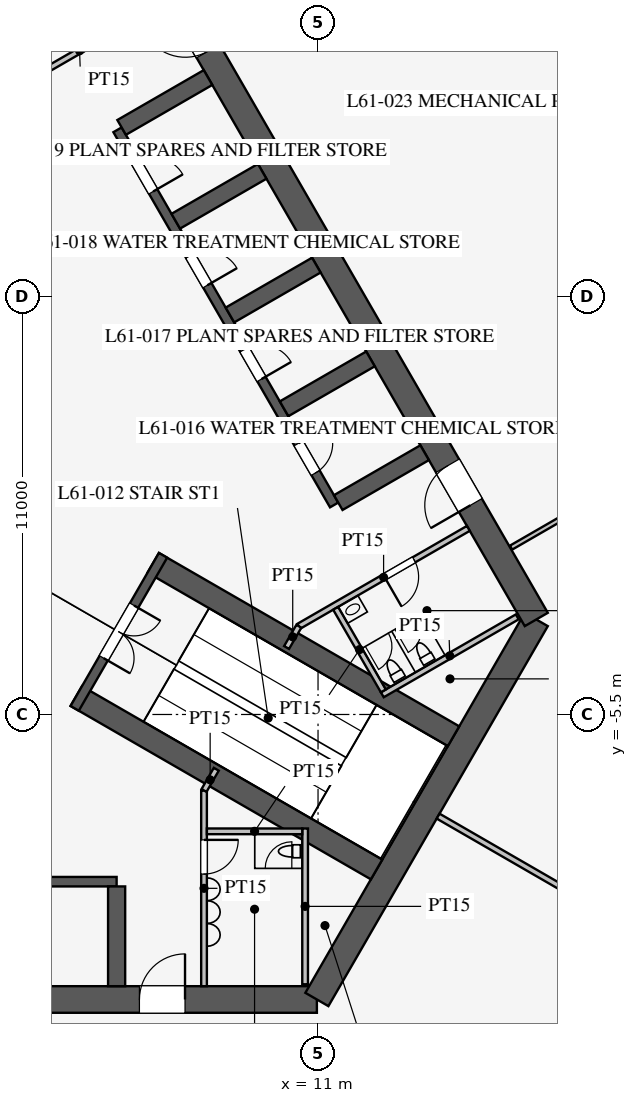
"""IFC4 building model, lengths in metres.
Left out: names, types, materials, properties, quantities, classifications, styles, units other than length and angle.
Written with IfcOpenShell. Run it as: python <this file> out.ifc"""

import sys

from ifc_helpers import new_model, si_unit, direction, frame, frame_2d, origin, place, context, subcontext, project, spatial, rectangle, extrude, element, fill, save


model = new_model("IFC4")
c1 = context("Model", 3, precision=1e-05, world=origin(), true_north=direction((0.0, 1.0)))
c2 = subcontext(c1, "Body", "Model", "MODEL_VIEW")
j1 = project(units=[si_unit("LENGTHUNIT", "METRE"), si_unit("PLANEANGLEUNIT", "RADIAN")], contexts=[c1])
p1 = place(None, origin())
s1 = spatial("IfcSite", under=j1, at=p1, CompositionType="ELEMENT")
p2 = place(p1, origin())
s2 = spatial("IfcBuilding", under=s1, at=p2, CompositionType="ELEMENT")
p3 = place(p2, frame((0.0, 0.0, 265.3)))
s3 = spatial("IfcBuildingStorey", under=s2, at=p3, CompositionType="ELEMENT", Elevation=265.3)
p4 = place(p3, frame((-10.97, -13.0, 0.0), z_axis=(0.0, 0.0, 1.0), x_axis=(1.0, 0.0, 0.0)))
e1 = element("IfcWall", 1, at=p4, inside=s3, PredefinedType="SHEAR", context=c2, shape_type="SweptSolid", body=[
    extrude(rectangle(XDim=21.939, YDim=0.7, at=frame_2d((10.97, 0.0))), origin(), (0.0, 0.0, 1.0), 6.0),
])
p5 = place(p4, frame((17.27, 0.0, 0.0)))
e2 = element("IfcOpeningElement", 2, at=p5, cuts=e1, PredefinedType="OPENING", context=c2, shape_type="SweptSolid", body=[
    extrude(rectangle(XDim=1.2, YDim=2.1, at=frame_2d((0.6, 1.05))), frame((0.0, 0.36, 0.0), z_axis=(0.0, -1.0, 0.0), x_axis=(1.0, 0.0, 0.0)), (0.0, 0.0, 1.0), 0.72),
])
p6 = place(p4, frame((3.47, 0.0, 0.0)))
e3 = element("IfcOpeningElement", 3, at=p6, cuts=e1, PredefinedType="OPENING", context=c2, shape_type="SweptSolid", body=[
    extrude(rectangle(XDim=1.2, YDim=2.1, at=frame_2d((0.6, 1.05))), frame((0.0, 0.36, 0.0), z_axis=(0.0, -1.0, 0.0), x_axis=(1.0, 0.0, 0.0)), (0.0, 0.0, 1.0), 0.72),
])
p7 = place(p3, frame((10.97, -13.0, 0.0), z_axis=(0.0, 0.0, 1.0), x_axis=(0.499995765644, 0.866027848477, 0.0)))
e4 = element("IfcWall", 4, at=p7, inside=s3, PredefinedType="SHEAR", context=c2, shape_type="SweptSolid", body=[
    extrude(rectangle(XDim=11.547, YDim=0.7, at=frame_2d((5.773, 0.0))), origin(), (0.0, 0.0, 1.0), 6.0),
])
p8 = place(p3, frame((16.743, -3.0, 0.0), z_axis=(0.0, 0.0, 1.0), x_axis=(-0.500002442456, 0.866023993627, 0.0)))
e5 = element("IfcWall", 5, at=p8, inside=s3, PredefinedType="SHEAR", context=c2, shape_type="SweptSolid", body=[
    extrude(rectangle(XDim=21.939, YDim=0.7, at=frame_2d((10.97, 0.0))), origin(), (0.0, 0.0, 1.0), 6.0),
])
p9 = place(p8, frame((17.27, 0.0, 0.0)))
e6 = element("IfcOpeningElement", 6, at=p9, cuts=e5, PredefinedType="OPENING", context=c2, shape_type="SweptSolid", body=[
    extrude(rectangle(XDim=1.2, YDim=2.1, at=frame_2d((0.6, 1.05))), frame((0.0, 0.36, 0.0), z_axis=(0.0, -1.0, 0.0), x_axis=(1.0, 0.0, 0.0)), (0.0, 0.0, 1.0), 0.72),
])
p10 = place(p8, frame((3.47, 0.0, 0.0)))
e7 = element("IfcOpeningElement", 7, at=p10, cuts=e5, PredefinedType="OPENING", context=c2, shape_type="SweptSolid", body=[
    extrude(rectangle(XDim=1.2, YDim=2.1, at=frame_2d((0.6, 1.05))), frame((0.0, 0.36, 0.0), z_axis=(0.0, -1.0, 0.0), x_axis=(1.0, 0.0, 0.0)), (0.0, 0.0, 1.0), 0.72),
])
p11 = place(p3, frame((-5.7, -9.9, 0.0), z_axis=(0.0, 0.0, 1.0), x_axis=(1.0, 0.0, 0.0)))
e8 = element("IfcWall", 8, at=p11, inside=s3, PredefinedType="SHEAR", context=c2, shape_type="SweptSolid", body=[
    extrude(rectangle(XDim=11.4, YDim=0.25, at=frame_2d((5.7, 0.0))), origin(), (0.0, 0.0, 1.0), 6.0),
])
p12 = place(p3, frame((5.7, -10.025, 0.0), z_axis=(0.0, 0.0, 1.0), x_axis=(0.0, -1.0, 0.0)))
e9 = element("IfcWall", 9, at=p12, inside=s3, PredefinedType="SHEAR", context=c2, shape_type="SweptSolid", body=[
    extrude(rectangle(XDim=2.625, YDim=0.45, at=frame_2d((1.312, 0.0))), origin(), (0.0, 0.0, 1.0), 6.0),
])
p13 = place(p3, frame((11.424, 0.014, 0.0), z_axis=(0.0, 0.0, 1.0), x_axis=(-0.500001763848, 0.866024385424, 0.0)))
e10 = element("IfcWall", 10, at=p13, inside=s3, PredefinedType="SHEAR", context=c2, shape_type="SweptSolid", body=[
    extrude(rectangle(XDim=11.4, YDim=0.25, at=frame_2d((5.7, 0.0))), origin(), (0.0, 0.0, 1.0), 6.0),
])
p14 = place(p13, frame((0.975, 0.0, 0.0)))
e11 = element("IfcOpeningElement", 11, at=p14, cuts=e10, PredefinedType="OPENING", context=c2, shape_type="SweptSolid", body=[
    extrude(rectangle(XDim=0.9, YDim=2.1, at=frame_2d((0.45, 1.05))), frame((0.0, 0.135, 0.0), z_axis=(0.0, -1.0, 0.0), x_axis=(1.0, 0.0, 0.0)), (0.0, 0.0, 1.0), 0.27),
])
p15 = place(p13, frame((3.825, 0.0, 0.0)))
e12 = element("IfcOpeningElement", 12, at=p15, cuts=e10, PredefinedType="OPENING", context=c2, shape_type="SweptSolid", body=[
    extrude(rectangle(XDim=0.9, YDim=2.1, at=frame_2d((0.45, 1.05))), frame((0.0, 0.135, 0.0), z_axis=(0.0, -1.0, 0.0), x_axis=(1.0, 0.0, 0.0)), (0.0, 0.0, 1.0), 0.27),
])
p16 = place(p13, frame((6.675, 0.0, 0.0)))
e13 = element("IfcOpeningElement", 13, at=p16, cuts=e10, PredefinedType="OPENING", context=c2, shape_type="SweptSolid", body=[
    extrude(rectangle(XDim=0.9, YDim=2.1, at=frame_2d((0.45, 1.05))), frame((0.0, 0.135, 0.0), z_axis=(0.0, -1.0, 0.0), x_axis=(1.0, 0.0, 0.0)), (0.0, 0.0, 1.0), 0.27),
])
p17 = place(p13, frame((9.525, 0.0, 0.0)))
e14 = element("IfcOpeningElement", 14, at=p17, cuts=e10, PredefinedType="OPENING", context=c2, shape_type="SweptSolid", body=[
    extrude(rectangle(XDim=0.9, YDim=2.1, at=frame_2d((0.45, 1.05))), frame((0.0, 0.135, 0.0), z_axis=(0.0, -1.0, 0.0), x_axis=(1.0, 0.0, 0.0)), (0.0, 0.0, 1.0), 0.27),
])
for number, where, z_axis, x_axis in (
    (15, (11.532, 0.076, 0.0), (0.0, 0.0, 1.0), (0.866, 0.5, 0.0)),
    (16, (10.107, 2.544, 0.0), (0.0, 0.0, 1.0), (0.866, 0.5, 0.0)),
    (17, (8.682, 5.012, 0.0), (0.0, 0.0, 1.0), (0.866, 0.5, 0.0)),
    (18, (7.257, 7.481, 0.0), (0.0, 0.0, 1.0), (0.866, 0.5, 0.0)),
    (19, (5.832, 9.949, 0.0), (0.0, 0.0, 1.0), (0.866, 0.5, 0.0)),
):
    element("IfcWall", number, at=place(p3, frame(where, z_axis=z_axis, x_axis=x_axis)), inside=s3, PredefinedType="SHEAR", context=c2, shape_type="SweptSolid", body=[
        extrude(rectangle(XDim=2.625, YDim=0.45, at=frame_2d((1.312, 0.0))), origin(), (0.0, 0.0, 1.0), 6.0),
    ])
for number, where, z_axis, x_axis in (
    (20, (4.638, -5.016, 0.0), (0.0, 0.0, 1.0), (0.866, -0.5, 0.0)),
    (21, (6.663, -1.509, 0.0), (0.0, 0.0, 1.0), (0.866, -0.5, 0.0)),
):
    element("IfcWall", number, at=place(p3, frame(where, z_axis=z_axis, x_axis=x_axis)), inside=s3, PredefinedType="SHEAR", context=c2, shape_type="SweptSolid", body=[
        extrude(rectangle(XDim=9.125, YDim=0.6, at=frame_2d((4.562, 0.0))), origin(), (0.0, 0.0, 1.0), 6.0),
    ])
p18 = place(p3, frame((4.597, -5.339, 0.0), z_axis=(0.0, 0.0, 1.0), x_axis=(0.499984536904, 0.866034331223, 0.0)))
e22 = element("IfcWall", 22, at=p18, inside=s3, PredefinedType="SHEAR", context=c2, shape_type="SweptSolid", body=[
    extrude(rectangle(XDim=4.65, YDim=0.25, at=frame_2d((2.325, 0.0))), origin(), (0.0, 0.0, 1.0), 6.0),
])
p19 = place(p18, frame((1.525, 0.0, 0.0)))
e23 = element("IfcOpeningElement", 23, at=p19, cuts=e22, PredefinedType="OPENING", context=c2, shape_type="SweptSolid", body=[
    extrude(rectangle(XDim=1.6, YDim=2.1, at=frame_2d((0.8, 1.05))), frame((0.0, 0.135, 0.0), z_axis=(0.0, -1.0, 0.0), x_axis=(1.0, 0.0, 0.0)), (0.0, 0.0, 1.0), 0.27),
])
p20 = place(p3, frame((8.0, -7.5, 0.0), z_axis=(0.0, 0.0, 1.0), x_axis=(0.0, -1.0, 0.0)))
e24 = element("IfcWall", 24, at=p20, inside=s3, PredefinedType="PARTITIONING", context=c2, shape_type="SweptSolid", body=[
    extrude(rectangle(XDim=5.15, YDim=0.15, at=frame_2d((2.575, 0.0))), origin(), (0.0, 0.0, 1.0), 5.8),
])
p21 = place(p20, frame((1.3, 0.0, 0.0)))
e25 = element("IfcOpeningElement", 25, at=p21, cuts=e24, PredefinedType="OPENING", context=c2, shape_type="SweptSolid", body=[
    extrude(rectangle(XDim=0.9, YDim=2.1, at=frame_2d((0.45, 1.05))), frame((0.0, 0.085, 0.0), z_axis=(0.0, -1.0, 0.0), x_axis=(1.0, 0.0, 0.0)), (0.0, 0.0, 1.0), 0.17),
])
p22 = place(p3, frame((2.495, 10.678, 0.0), z_axis=(0.0, 0.0, 1.0), x_axis=(0.866037967349, 0.499978238636, 0.0)))
e26 = element("IfcWall", 26, at=p22, inside=s3, PredefinedType="PARTITIONING", context=c2, shape_type="SweptSolid", body=[
    extrude(rectangle(XDim=5.15, YDim=0.15, at=frame_2d((2.575, 0.0))), origin(), (0.0, 0.0, 1.0), 5.8),
])
p23 = place(p22, frame((2.6, 0.0, 0.0)))
e27 = element("IfcOpeningElement", 27, at=p23, cuts=e26, PredefinedType="OPENING", context=c2, shape_type="SweptSolid", body=[
    extrude(rectangle(XDim=0.9, YDim=2.1, at=frame_2d((0.45, 1.05))), frame((0.0, 0.085, 0.0), z_axis=(0.0, -1.0, 0.0), x_axis=(1.0, 0.0, 0.0)), (0.0, 0.0, 1.0), 0.17),
])
p24 = place(p3, frame((10.495, -3.178, 0.0), z_axis=(0.0, 0.0, 1.0), x_axis=(0.866037967349, 0.499978238636, 0.0)))
e28 = element("IfcWall", 28, at=p24, inside=s3, PredefinedType="PARTITIONING", context=c2, shape_type="SweptSolid", body=[
    extrude(rectangle(XDim=5.15, YDim=0.15, at=frame_2d((2.575, 0.0))), origin(), (0.0, 0.0, 1.0), 5.8),
])
p25 = place(p24, frame((2.6, 0.0, 0.0)))
e29 = element("IfcOpeningElement", 29, at=p25, cuts=e28, PredefinedType="OPENING", context=c2, shape_type="SweptSolid", body=[
    extrude(rectangle(XDim=0.9, YDim=2.1, at=frame_2d((0.45, 1.05))), frame((0.0, 0.085, 0.0), z_axis=(0.0, -1.0, 0.0), x_axis=(1.0, 0.0, 0.0)), (0.0, 0.0, 1.0), 0.17),
])
for number, where, z_axis, x_axis in (
    (30, (8.0, -7.5, 0.0), (0.0, 0.0, 1.0), (0.5, 0.866, 0.0)),
    (31, (10.495, -3.178, 0.0), (0.0, 0.0, 1.0), (-0.5, -0.866, 0.0)),
):
    element("IfcWall", number, at=place(p3, frame(where, z_axis=z_axis, x_axis=x_axis)), inside=s3, PredefinedType="PARTITIONING", context=c2, shape_type="SweptSolid", body=[
        extrude(rectangle(XDim=0.645, YDim=0.15, at=frame_2d((0.323, 0.0))), origin(), (0.0, 0.0, 1.0), 5.8),
    ])
p26 = place(p3, frame((10.66, -8.5, 0.0), z_axis=(0.0, 0.0, 1.0), x_axis=(0.0, -1.0, 0.0)))
e32 = element("IfcWall", 32, at=p26, inside=s3, PredefinedType="PARTITIONING", context=c2, shape_type="SweptSolid", body=[
    extrude(rectangle(XDim=4.1, YDim=0.15, at=frame_2d((2.05, 0.0))), origin(), (0.0, 0.0, 1.0), 5.8),
])
p27 = place(p3, frame((8.075, -8.575, 0.0), z_axis=(0.0, 0.0, 1.0), x_axis=(1.0, 0.0, 0.0)))
e33 = element("IfcWall", 33, at=p27, inside=s3, PredefinedType="PARTITIONING", context=c2, shape_type="SweptSolid", body=[
    extrude(rectangle(XDim=2.51, YDim=0.15, at=frame_2d((1.255, 0.0))), origin(), (0.0, 0.0, 1.0), 5.8),
])
p28 = place(p3, frame((12.691, -4.982, 0.0), z_axis=(0.0, 0.0, 1.0), x_axis=(0.8660249478, 0.500000789788, 0.0)))
e34 = element("IfcWall", 34, at=p28, inside=s3, PredefinedType="PARTITIONING", context=c2, shape_type="SweptSolid", body=[
    extrude(rectangle(XDim=4.1, YDim=0.15, at=frame_2d((2.05, 0.0))), origin(), (0.0, 0.0, 1.0), 5.8),
])
p29 = place(p3, frame((11.464, -2.706, 0.0), z_axis=(0.0, 0.0, 1.0), x_axis=(0.50001992892, -0.866013897511, 0.0)))
e35 = element("IfcWall", 35, at=p29, inside=s3, PredefinedType="PARTITIONING", context=c2, shape_type="SweptSolid", body=[
    extrude(rectangle(XDim=2.51, YDim=0.15, at=frame_2d((1.255, 0.0))), origin(), (0.0, 0.0, 1.0), 5.8),
])
p30 = place(p3, frame((14.159, -8.175, 0.0), z_axis=(0.0, 0.0, 1.0), x_axis=(0.866026905467, -0.499997399001, 0.0)))
e36 = element("IfcWall", 36, at=p30, inside=s3, PredefinedType="PARTITIONING", context=c2, shape_type="SweptSolid", body=[
    extrude(rectangle(XDim=13.4, YDim=0.15, at=frame_2d((6.7, 0.0))), origin(), (0.0, 0.0, 1.0), 4.3),
])
p31 = place(p3, frame((16.079, -1.109, 0.0), z_axis=(0.0, 0.0, 1.0), x_axis=(0.866026165896, 0.499998679983, 0.0)))
e37 = element("IfcWall", 37, at=p31, inside=s3, PredefinedType="PARTITIONING", context=c2, shape_type="SweptSolid", body=[
    extrude(rectangle(XDim=9.13, YDim=0.12, at=frame_2d((4.565, 0.0))), origin(), (0.0, 0.0, 1.0), 2.9),
])
p32 = place(p31, frame((2.05, 0.0, 0.0)))
e38 = element("IfcOpeningElement", 38, at=p32, cuts=e37, PredefinedType="OPENING", context=c2, shape_type="SweptSolid", body=[
    extrude(rectangle(XDim=0.9, YDim=2.1, at=frame_2d((0.45, 1.05))), frame((0.0, 0.07, 0.0), z_axis=(0.0, -1.0, 0.0), x_axis=(1.0, 0.0, 0.0)), (0.0, 0.0, 1.0), 0.14),
])
p33 = place(p21, origin())
e39 = element("IfcDoor", 39, at=p33, inside=s3, OperationType="SINGLE_SWING_LEFT", PredefinedType="DOOR", context=c2, shape_type="SweptSolid", body=[
    extrude(rectangle(XDim=0.9, YDim=2.1, at=frame_2d((0.45, 1.05))), frame((0.0, 0.025, 0.0), z_axis=(0.0, -1.0, 0.0), x_axis=(1.0, 0.0, 0.0)), (0.0, 0.0, 1.0), 0.05),
])
fill(e25, e39)
p34 = place(p25, frame((0.9, 0.0, 0.0), z_axis=(0.0, 0.0, 1.0), x_axis=(-1.0, 0.0, 0.0)))
e40 = element("IfcDoor", 40, at=p34, inside=s3, OperationType="SINGLE_SWING_RIGHT", PredefinedType="DOOR", context=c2, shape_type="SweptSolid", body=[
    extrude(rectangle(XDim=0.9, YDim=2.1, at=frame_2d((0.45, 1.05))), frame((0.0, 0.025, 0.0), z_axis=(0.0, -1.0, 0.0), x_axis=(1.0, 0.0, 0.0)), (0.0, 0.0, 1.0), 0.05),
])
fill(e29, e40)
p35 = place(p19, frame((1.6, 0.0, 0.0), z_axis=(0.0, 0.0, 1.0), x_axis=(-1.0, 0.0, 0.0)))
e41 = element("IfcDoor", 41, at=p35, inside=s3, OperationType="DOUBLE_DOOR_SINGLE_SWING", PredefinedType="DOOR", context=c2, shape_type="SweptSolid", body=[
    extrude(rectangle(XDim=1.6, YDim=2.1, at=frame_2d((0.8, 1.05))), frame((0.0, 0.025, 0.0), z_axis=(0.0, -1.0, 0.0), x_axis=(1.0, 0.0, 0.0)), (0.0, 0.0, 1.0), 0.05),
])
fill(e23, e41)
p36 = place(p5, origin())
e42 = element("IfcDoor", 42, at=p36, inside=s3, OperationType="SINGLE_SWING_RIGHT", PredefinedType="DOOR", context=c2, shape_type="SweptSolid", body=[
    extrude(rectangle(XDim=1.2, YDim=2.1, at=frame_2d((0.6, 1.05))), frame((0.0, 0.025, 0.0), z_axis=(0.0, -1.0, 0.0), x_axis=(1.0, 0.0, 0.0)), (0.0, 0.0, 1.0), 0.05),
])
fill(e2, e42)
p37 = place(p9, origin())
e43 = element("IfcDoor", 43, at=p37, inside=s3, OperationType="SINGLE_SWING_RIGHT", PredefinedType="DOOR", context=c2, shape_type="SweptSolid", body=[
    extrude(rectangle(XDim=1.2, YDim=2.1, at=frame_2d((0.6, 1.05))), frame((0.0, 0.025, 0.0), z_axis=(0.0, -1.0, 0.0), x_axis=(1.0, 0.0, 0.0)), (0.0, 0.0, 1.0), 0.05),
])
fill(e6, e43)
p38 = place(p10, origin())
e44 = element("IfcDoor", 44, at=p38, inside=s3, OperationType="SINGLE_SWING_LEFT", PredefinedType="DOOR", context=c2, shape_type="SweptSolid", body=[
    extrude(rectangle(XDim=1.2, YDim=2.1, at=frame_2d((0.6, 1.05))), frame((0.0, 0.025, 0.0), z_axis=(0.0, -1.0, 0.0), x_axis=(1.0, 0.0, 0.0)), (0.0, 0.0, 1.0), 0.05),
])
fill(e7, e44)
p39 = place(p14, frame((0.9, 0.0, 0.0), z_axis=(0.0, 0.0, 1.0), x_axis=(-1.0, 0.0, 0.0)))
e45 = element("IfcDoor", 45, at=p39, inside=s3, OperationType="SINGLE_SWING_LEFT", PredefinedType="DOOR", context=c2, shape_type="SweptSolid", body=[
    extrude(rectangle(XDim=0.9, YDim=2.1, at=frame_2d((0.45, 1.05))), frame((0.0, 0.025, 0.0), z_axis=(0.0, -1.0, 0.0), x_axis=(1.0, 0.0, 0.0)), (0.0, 0.0, 1.0), 0.05),
])
fill(e11, e45)
p40 = place(p15, frame((0.9, 0.0, 0.0), z_axis=(0.0, 0.0, 1.0), x_axis=(-1.0, 0.0, 0.0)))
e46 = element("IfcDoor", 46, at=p40, inside=s3, OperationType="SINGLE_SWING_RIGHT", PredefinedType="DOOR", context=c2, shape_type="SweptSolid", body=[
    extrude(rectangle(XDim=0.9, YDim=2.1, at=frame_2d((0.45, 1.05))), frame((0.0, 0.025, 0.0), z_axis=(0.0, -1.0, 0.0), x_axis=(1.0, 0.0, 0.0)), (0.0, 0.0, 1.0), 0.05),
])
fill(e12, e46)
p41 = place(p16, frame((0.9, 0.0, 0.0), z_axis=(0.0, 0.0, 1.0), x_axis=(-1.0, 0.0, 0.0)))
e47 = element("IfcDoor", 47, at=p41, inside=s3, OperationType="SINGLE_SWING_RIGHT", PredefinedType="DOOR", context=c2, shape_type="SweptSolid", body=[
    extrude(rectangle(XDim=0.9, YDim=2.1, at=frame_2d((0.45, 1.05))), frame((0.0, 0.025, 0.0), z_axis=(0.0, -1.0, 0.0), x_axis=(1.0, 0.0, 0.0)), (0.0, 0.0, 1.0), 0.05),
])
fill(e13, e47)
p42 = place(p17, frame((0.9, 0.0, 0.0), z_axis=(0.0, 0.0, 1.0), x_axis=(-1.0, 0.0, 0.0)))
e48 = element("IfcDoor", 48, at=p42, inside=s3, OperationType="SINGLE_SWING_RIGHT", PredefinedType="DOOR", context=c2, shape_type="SweptSolid", body=[
    extrude(rectangle(XDim=0.9, YDim=2.1, at=frame_2d((0.45, 1.05))), frame((0.0, 0.025, 0.0), z_axis=(0.0, -1.0, 0.0), x_axis=(1.0, 0.0, 0.0)), (0.0, 0.0, 1.0), 0.05),
])
fill(e14, e48)
save(model, sys.argv[1])
